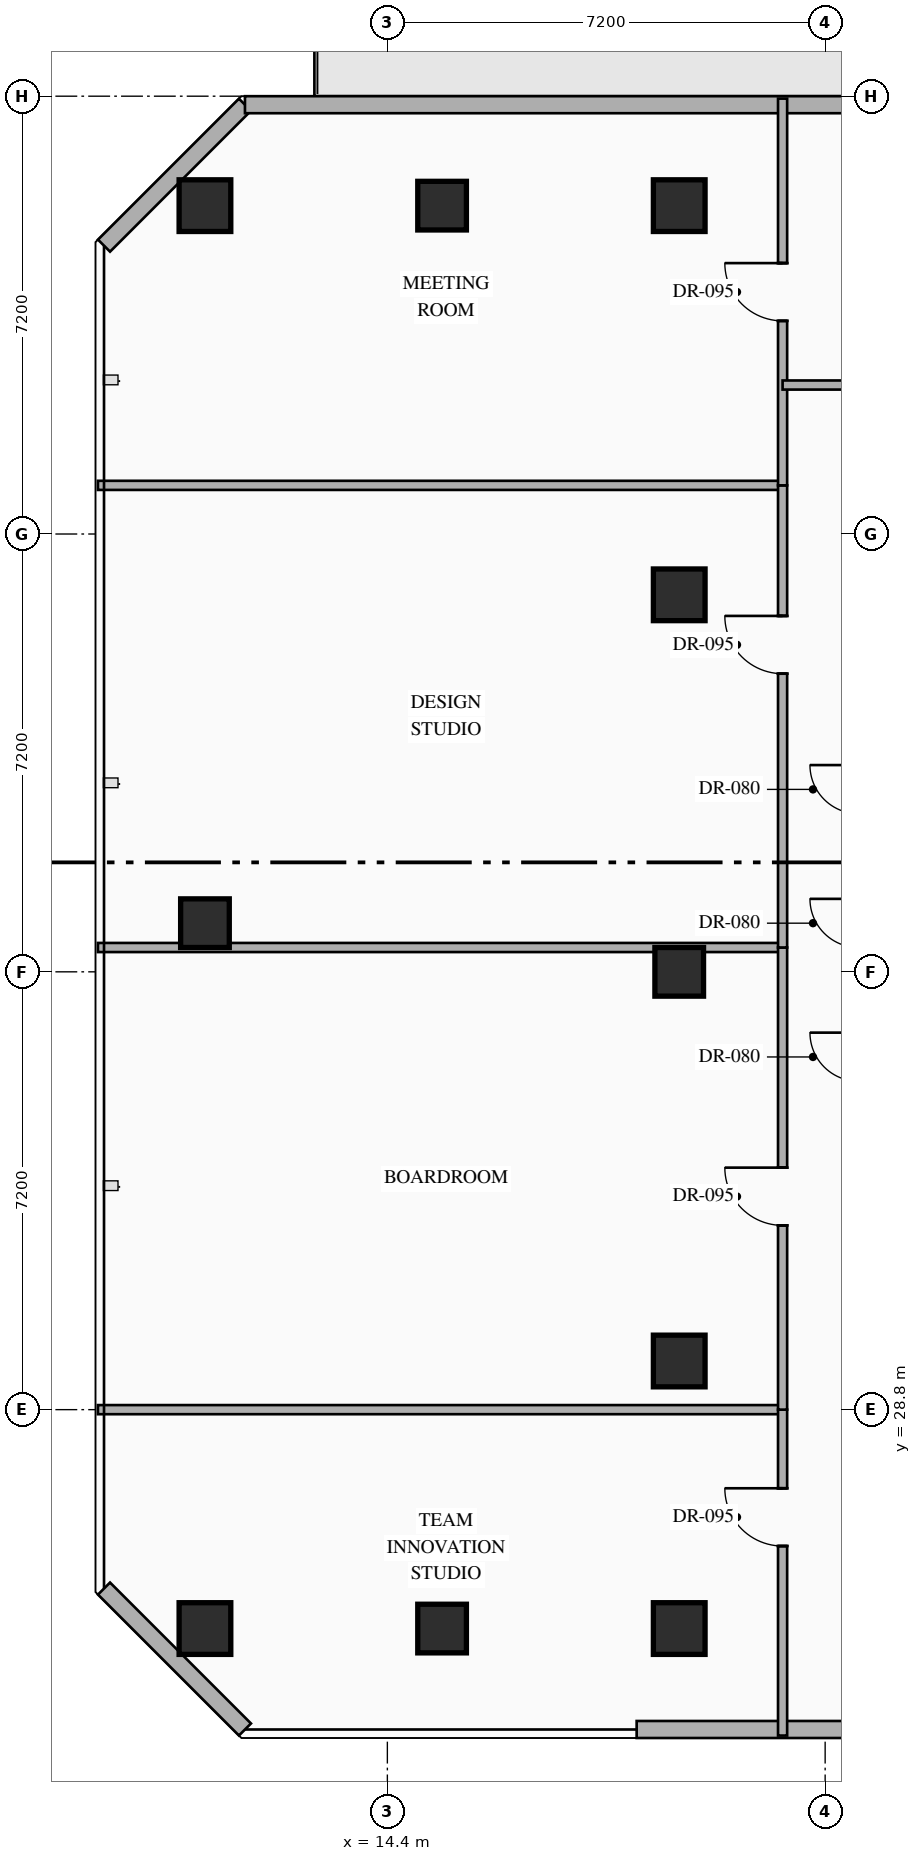
"""IFC4 building model, lengths in metres.
Left out: names, types, materials, properties, quantities, classifications, styles, units other than length and angle.
Written with IfcOpenShell. Run it as: python <this file> out.ifc"""

import sys

from ifc_helpers import new_model, si_unit, direction, frame, frame_2d, origin, origin_2d, place, context, subcontext, project, spatial, rectangle, hollow_rectangle, extrude, element, fill, save


model = new_model("IFC4")
c1 = context("Model", 3, precision=1e-05, world=origin(), true_north=direction((0.0, 1.0)))
c2 = subcontext(c1, "Body", "Model", "MODEL_VIEW")
j1 = project(units=[si_unit("LENGTHUNIT", "METRE"), si_unit("PLANEANGLEUNIT", "RADIAN")], contexts=[c1])
p1 = place(None, origin())
s1 = spatial("IfcSite", under=j1, at=p1, CompositionType="ELEMENT")
p2 = place(p1, origin())
s2 = spatial("IfcBuilding", under=s1, at=p2, CompositionType="ELEMENT")
p3 = place(p2, frame((0.0, 0.0, 160.05)))
s3 = spatial("IfcBuildingStorey", under=s2, at=p3, CompositionType="ELEMENT", Elevation=160.05)
for number, where, z_axis, x_axis in (
    (1, (11.4, 25.2, 0.0), (0.0, 0.0, 1.0), (1.0, 0.0, 0.0)),
    (2, (11.4, 48.6, 0.0), (0.0, 0.0, 1.0), (1.0, 0.0, 0.0)),
    (3, (19.2, 48.6, 0.0), (0.0, 0.0, 1.0), (1.0, 0.0, 0.0)),
    (4, (19.2, 25.2, 0.0), (0.0, 0.0, 1.0), (1.0, 0.0, 0.0)),
    (5, (19.2, 29.6, 0.0), (0.0, 0.0, 1.0), (1.0, 0.0, 0.0)),
    (6, (19.2, 42.2, 0.0), (0.0, 0.0, 1.0), (1.0, 0.0, 0.0)),
):
    element("IfcColumn", number, at=place(p3, frame(where, z_axis=z_axis, x_axis=x_axis)), inside=s3, PredefinedType="COLUMN", context=c2, shape_type="SweptSolid", body=[
        extrude(hollow_rectangle(XDim=0.85, YDim=0.85, WallThickness=0.032, at=origin_2d()), origin(), (0.0, 0.0, 1.0), 3.6),
    ])
for number, where, z_axis, x_axis in (
    (7, (11.4, 36.8, 0.0), (0.0, 0.0, 1.0), (1.0, 0.0, 0.0)),
    (8, (19.2, 36.0, 0.0), (0.0, 0.0, 1.0), (1.0, 0.0, 0.0)),
    (9, (15.3, 25.2, 0.0), (0.0, 0.0, 1.0), (1.0, 0.0, 0.0)),
    (10, (15.3, 48.6, 0.0), (0.0, 0.0, 1.0), (1.0, 0.0, 0.0)),
):
    element("IfcColumn", number, at=place(p3, frame(where, z_axis=z_axis, x_axis=x_axis)), inside=s3, PredefinedType="COLUMN", context=c2, shape_type="SweptSolid", body=[
        extrude(hollow_rectangle(XDim=0.8, YDim=0.8, WallThickness=0.032, at=origin_2d()), origin(), (0.0, 0.0, 1.0), 3.6),
    ])
p4 = place(p3, frame((25.247, 23.54, 0.0), z_axis=(0.0, 0.0, 1.0), x_axis=(-1.0, 0.0, 0.0)))
e11 = element("IfcWall", 11, at=p4, inside=s3, PredefinedType="STANDARD", context=c2, shape_type="SweptSolid", body=[
    extrude(rectangle(XDim=6.747, YDim=0.28, at=frame_2d((3.374, 0.0))), origin(), (0.0, 0.0, 1.0), 3.35),
])
p5 = place(p3, frame((12.058, 23.54, 0.0), z_axis=(0.0, 0.0, 1.0), x_axis=(-0.707144017911, 0.707069542501, 0.0)))
e12 = element("IfcWall", 12, at=p5, inside=s3, PredefinedType="STANDARD", context=c2, shape_type="SweptSolid", body=[
    extrude(rectangle(XDim=3.278, YDim=0.28, at=frame_2d((1.639, 0.0))), origin(), (0.0, 0.0, 1.0), 3.35),
])
p6 = place(p3, frame((9.74, 47.942, 0.0), z_axis=(0.0, 0.0, 1.0), x_axis=(0.707106781187, 0.707106781187, 0.0)))
e13 = element("IfcWall", 13, at=p6, inside=s3, PredefinedType="STANDARD", context=c2, shape_type="SweptSolid", body=[
    extrude(rectangle(XDim=3.278, YDim=0.28, at=frame_2d((1.639, 0.0))), origin(), (0.0, 0.0, 1.0), 3.35),
])
p7 = place(p3, frame((12.058, 50.26, 0.0), z_axis=(0.0, 0.0, 1.0), x_axis=(1.0, 0.0, 0.0)))
e14 = element("IfcWall", 14, at=p7, inside=s3, PredefinedType="STANDARD", context=c2, shape_type="SweptSolid", body=[
    extrude(rectangle(XDim=30.484, YDim=0.28, at=frame_2d((15.242, 0.0))), origin(), (0.0, 0.0, 1.0), 3.35),
])
p8 = place(p7, frame((10.424, 0.0, 0.0)))
e15 = element("IfcOpeningElement", 15, at=p8, cuts=e14, PredefinedType="OPENING", context=c2, shape_type="SweptSolid", body=[
    extrude(rectangle(XDim=1.1, YDim=2.2, at=frame_2d((0.55, 1.1))), frame((0.0, 0.15, 0.0), z_axis=(0.0, -1.0, 0.0), x_axis=(1.0, 0.0, 0.0)), (0.0, 0.0, 1.0), 0.3),
])
p9 = place(p3, frame((9.64, 28.8, 0.0), z_axis=(0.0, 0.0, 1.0), x_axis=(1.0, 0.0, 0.0)))
e16 = element("IfcWall", 16, at=p9, inside=s3, PredefinedType="PARTITIONING", context=c2, shape_type="SweptSolid", body=[
    extrude(rectangle(XDim=11.26, YDim=0.15, at=frame_2d((5.63, 0.0))), origin(), (0.0, 0.0, 1.0), 3.35),
])
p10 = place(p3, frame((20.9, 23.44, 0.0), z_axis=(0.0, 0.0, 1.0), x_axis=(0.0, 1.0, 0.0)))
e17 = element("IfcWall", 17, at=p10, inside=s3, PredefinedType="PARTITIONING", context=c2, shape_type="SweptSolid", body=[
    extrude(rectangle(XDim=5.36, YDim=0.15, at=frame_2d((2.68, 0.0))), origin(), (0.0, 0.0, 1.0), 3.35),
])
p11 = place(p10, frame((3.117, 0.0, 0.0)))
e18 = element("IfcOpeningElement", 18, at=p11, cuts=e17, PredefinedType="OPENING", context=c2, shape_type="SweptSolid", body=[
    extrude(rectangle(XDim=0.95, YDim=2.15, at=frame_2d((0.475, 1.075))), frame((0.0, 0.085, 0.0), z_axis=(0.0, -1.0, 0.0), x_axis=(1.0, 0.0, 0.0)), (0.0, 0.0, 1.0), 0.17),
])
p12 = place(p3, frame((9.64, 36.4, 0.0), z_axis=(0.0, 0.0, 1.0), x_axis=(1.0, 0.0, 0.0)))
e19 = element("IfcWall", 19, at=p12, inside=s3, PredefinedType="PARTITIONING", context=c2, shape_type="SweptSolid", body=[
    extrude(rectangle(XDim=11.26, YDim=0.15, at=frame_2d((5.63, 0.0))), origin(), (0.0, 0.0, 1.0), 2.695),
])
p13 = place(p3, frame((20.9, 28.8, 0.0), z_axis=(0.0, 0.0, 1.0), x_axis=(0.0, 1.0, 0.0)))
e20 = element("IfcWall", 20, at=p13, inside=s3, PredefinedType="PARTITIONING", context=c2, shape_type="SweptSolid", body=[
    extrude(rectangle(XDim=7.6, YDim=0.15, at=frame_2d((3.8, 0.0))), origin(), (0.0, 0.0, 1.0), 3.35),
])
p14 = place(p13, frame((3.03, 0.0, 0.0)))
e21 = element("IfcOpeningElement", 21, at=p14, cuts=e20, PredefinedType="OPENING", context=c2, shape_type="SweptSolid", body=[
    extrude(rectangle(XDim=0.95, YDim=2.15, at=frame_2d((0.475, 1.075))), frame((0.0, 0.085, 0.0), z_axis=(0.0, -1.0, 0.0), x_axis=(1.0, 0.0, 0.0)), (0.0, 0.0, 1.0), 0.17),
])
p15 = place(p3, frame((9.64, 44.0, 0.0), z_axis=(0.0, 0.0, 1.0), x_axis=(1.0, 0.0, 0.0)))
e22 = element("IfcWall", 22, at=p15, inside=s3, PredefinedType="PARTITIONING", context=c2, shape_type="SweptSolid", body=[
    extrude(rectangle(XDim=11.26, YDim=0.15, at=frame_2d((5.63, 0.0))), origin(), (0.0, 0.0, 1.0), 3.35),
])
p16 = place(p3, frame((20.9, 36.4, 0.0), z_axis=(0.0, 0.0, 1.0), x_axis=(0.0, 1.0, 0.0)))
e23 = element("IfcWall", 23, at=p16, inside=s3, PredefinedType="PARTITIONING", context=c2, shape_type="SweptSolid", body=[
    extrude(rectangle(XDim=7.6, YDim=0.15, at=frame_2d((3.8, 0.0))), origin(), (0.0, 0.0, 1.0), 3.35),
])
p17 = place(p16, frame((4.503, 0.0, 0.0)))
e24 = element("IfcOpeningElement", 24, at=p17, cuts=e23, PredefinedType="OPENING", context=c2, shape_type="SweptSolid", body=[
    extrude(rectangle(XDim=0.95, YDim=2.15, at=frame_2d((0.475, 1.075))), frame((0.0, 0.085, 0.0), z_axis=(0.0, -1.0, 0.0), x_axis=(1.0, 0.0, 0.0)), (0.0, 0.0, 1.0), 0.17),
])
p18 = place(p3, frame((20.9, 44.0, 0.0), z_axis=(0.0, 0.0, 1.0), x_axis=(0.0, 1.0, 0.0)))
e25 = element("IfcWall", 25, at=p18, inside=s3, PredefinedType="PARTITIONING", context=c2, shape_type="SweptSolid", body=[
    extrude(rectangle(XDim=6.36, YDim=0.15, at=frame_2d((3.18, 0.0))), origin(), (0.0, 0.0, 1.0), 3.35),
])
p19 = place(p18, frame((2.705, 0.0, 0.0)))
e26 = element("IfcOpeningElement", 26, at=p19, cuts=e25, PredefinedType="OPENING", context=c2, shape_type="SweptSolid", body=[
    extrude(rectangle(XDim=0.95, YDim=2.15, at=frame_2d((0.475, 1.075))), frame((0.0, 0.085, 0.0), z_axis=(0.0, -1.0, 0.0), x_axis=(1.0, 0.0, 0.0)), (0.0, 0.0, 1.0), 0.17),
])
p20 = place(p3, frame((20.9, 45.65, 0.0), z_axis=(0.0, 0.0, 1.0), x_axis=(1.0, 0.0, 0.0)))
e27 = element("IfcWall", 27, at=p20, inside=s3, PredefinedType="PARTITIONING", context=c2, shape_type="SweptSolid", body=[
    extrude(rectangle(XDim=7.5, YDim=0.15, at=frame_2d((3.75, 0.0))), origin(), (0.0, 0.0, 1.0), 2.695),
])
p21 = place(p20, frame((1.827, 0.0, 0.0)))
e28 = element("IfcOpeningElement", 28, at=p21, cuts=e27, PredefinedType="OPENING", context=c2, shape_type="SweptSolid", body=[
    extrude(rectangle(XDim=0.95, YDim=2.15, at=frame_2d((0.475, 1.075))), frame((0.0, 0.085, 0.0), z_axis=(0.0, -1.0, 0.0), x_axis=(1.0, 0.0, 0.0)), (0.0, 0.0, 1.0), 0.17),
])
p22 = place(p11, origin())
e29 = element("IfcDoor", 29, at=p22, inside=s3, OperationType="SINGLE_SWING_RIGHT", PredefinedType="DOOR", context=c2, shape_type="SweptSolid", body=[
    extrude(rectangle(XDim=0.95, YDim=2.15, at=frame_2d((0.475, 1.075))), frame((0.0, 0.025, 0.0), z_axis=(0.0, -1.0, 0.0), x_axis=(1.0, 0.0, 0.0)), (0.0, 0.0, 1.0), 0.05),
])
fill(e18, e29)
p23 = place(p14, origin())
e30 = element("IfcDoor", 30, at=p23, inside=s3, OperationType="SINGLE_SWING_RIGHT", PredefinedType="DOOR", context=c2, shape_type="SweptSolid", body=[
    extrude(rectangle(XDim=0.95, YDim=2.15, at=frame_2d((0.475, 1.075))), frame((0.0, 0.025, 0.0), z_axis=(0.0, -1.0, 0.0), x_axis=(1.0, 0.0, 0.0)), (0.0, 0.0, 1.0), 0.05),
])
fill(e21, e30)
p24 = place(p17, origin())
e31 = element("IfcDoor", 31, at=p24, inside=s3, OperationType="SINGLE_SWING_RIGHT", PredefinedType="DOOR", context=c2, shape_type="SweptSolid", body=[
    extrude(rectangle(XDim=0.95, YDim=2.15, at=frame_2d((0.475, 1.075))), frame((0.0, 0.025, 0.0), z_axis=(0.0, -1.0, 0.0), x_axis=(1.0, 0.0, 0.0)), (0.0, 0.0, 1.0), 0.05),
])
fill(e24, e31)
p25 = place(p19, origin())
e32 = element("IfcDoor", 32, at=p25, inside=s3, OperationType="SINGLE_SWING_RIGHT", PredefinedType="DOOR", context=c2, shape_type="SweptSolid", body=[
    extrude(rectangle(XDim=0.95, YDim=2.15, at=frame_2d((0.475, 1.075))), frame((0.0, 0.025, 0.0), z_axis=(0.0, -1.0, 0.0), x_axis=(1.0, 0.0, 0.0)), (0.0, 0.0, 1.0), 0.05),
])
fill(e26, e32)
save(model, sys.argv[1])
